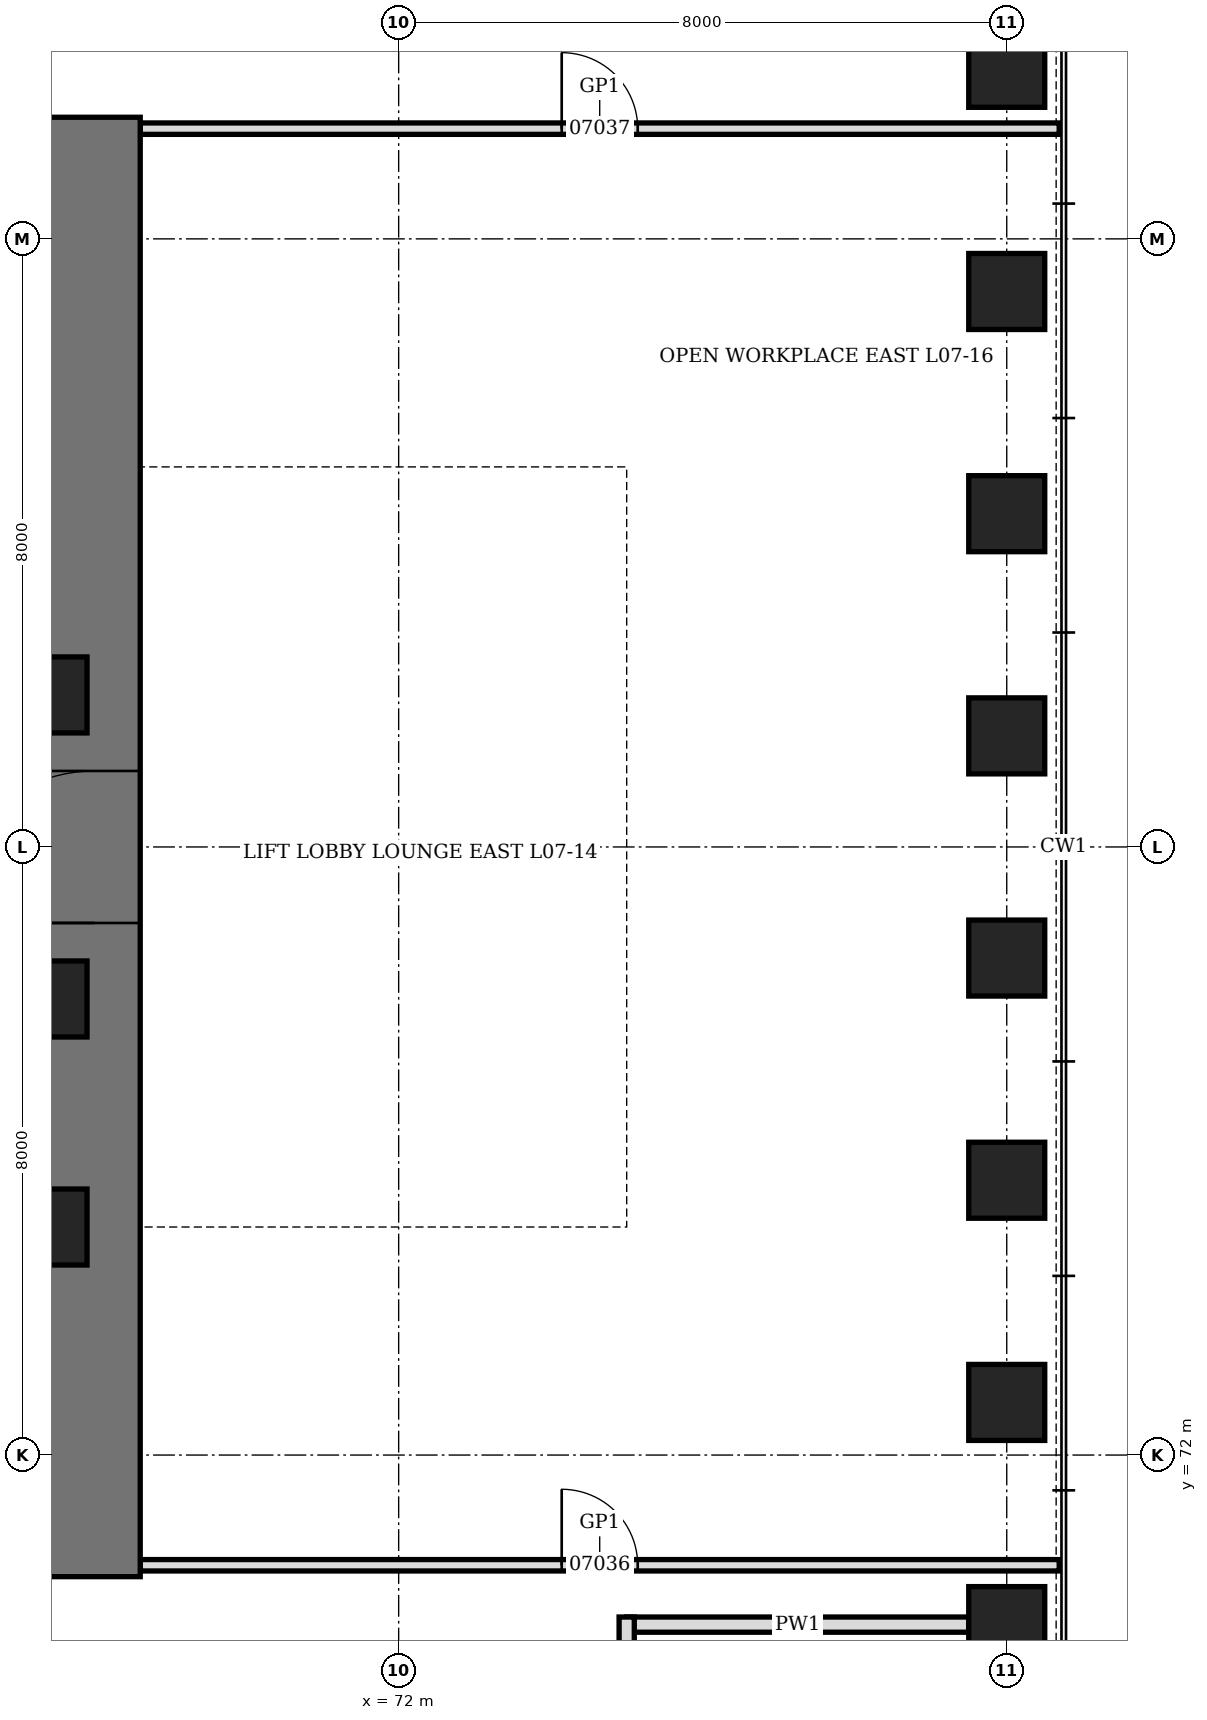
"""IFC4 building model, lengths in metres.
Left out: names, types, materials, properties, quantities, classifications, styles, units other than length and angle.
Written with IfcOpenShell. Run it as: python <this file> out.ifc"""

import sys

from ifc_helpers import new_model, si_unit, direction, frame, frame_2d, origin, origin_2d, place, context, subcontext, project, spatial, rectangle, hollow_rectangle, extrude, element, fill, save


model = new_model("IFC4")
c1 = context("Model", 3, precision=1e-05, world=origin(), true_north=direction((0.0, 1.0)))
c2 = subcontext(c1, "Body", "Model", "MODEL_VIEW")
j1 = project(units=[si_unit("LENGTHUNIT", "METRE"), si_unit("PLANEANGLEUNIT", "RADIAN")], contexts=[c1])
p1 = place(None, origin())
s1 = spatial("IfcSite", under=j1, at=p1, CompositionType="ELEMENT")
p2 = place(p1, origin())
s2 = spatial("IfcBuilding", under=s1, at=p2, CompositionType="ELEMENT")
p3 = place(p2, frame((0.0, 0.0, 39.1)))
s3 = spatial("IfcBuildingStorey", under=s2, at=p3, CompositionType="ELEMENT", Elevation=39.1)
for number, where, z_axis, x_axis in (
    (1, (80.0, 69.769, 0.0), (0.0, 0.0, 1.0), (0.0, 1.0, 0.0)),
    (2, (80.0, 72.692, 0.0), (0.0, 0.0, 1.0), (0.0, 1.0, 0.0)),
    (3, (80.0, 75.615, 0.0), (0.0, 0.0, 1.0), (0.0, 1.0, 0.0)),
    (4, (80.0, 78.539, 0.0), (0.0, 0.0, 1.0), (0.0, 1.0, 0.0)),
    (5, (80.0, 81.461, 0.0), (0.0, 0.0, 1.0), (0.0, 1.0, 0.0)),
    (6, (80.0, 84.385, 0.0), (0.0, 0.0, 1.0), (0.0, 1.0, 0.0)),
    (7, (80.0, 87.308, 0.0), (0.0, 0.0, 1.0), (0.0, 1.0, 0.0)),
    (8, (80.0, 90.231, 0.0), (0.0, 0.0, 1.0), (0.0, 1.0, 0.0)),
):
    element("IfcColumn", number, at=place(p3, frame(where, z_axis=z_axis, x_axis=x_axis)), inside=s3, PredefinedType="COLUMN", context=c2, shape_type="SweptSolid", body=[
        extrude(hollow_rectangle(XDim=1.0, YDim=1.0, WallThickness=0.35, at=origin_2d()), origin(), (0.0, 0.0, 1.0), 4.2),
    ])
p4 = place(p3, frame((68.0, 70.4, 0.0), z_axis=(0.0, 0.0, 1.0), x_axis=(0.0, 1.0, 0.0)))
e9 = element("IfcWall", 9, at=p4, inside=s3, PredefinedType="SHEAR", context=c2, shape_type="SweptSolid", body=[
    extrude(rectangle(XDim=19.2, YDim=1.2, at=frame_2d((9.6, 0.0))), origin(), (0.0, 0.0, 1.0), 4.2),
])
p5 = place(p4, frame((8.6, 0.0, 0.0)))
e10 = element("IfcOpeningElement", 10, at=p5, cuts=e9, PredefinedType="OPENING", context=c2, shape_type="SweptSolid", body=[
    extrude(rectangle(XDim=2.0, YDim=2.4, at=frame_2d((1.0, 1.2))), frame((0.0, 0.61, 0.0), z_axis=(0.0, -1.0, 0.0), x_axis=(1.0, 0.0, 0.0)), (0.0, 0.0, 1.0), 1.22),
])
for number, where, z_axis, x_axis in (
    (11, (67.4, 75.0, 0.0), (0.0, 0.0, 1.0), (1.0, 0.0, 0.0)),
    (12, (67.4, 78.0, 0.0), (0.0, 0.0, 1.0), (1.0, 0.0, 0.0)),
    (13, (67.4, 82.0, 0.0), (0.0, 0.0, 1.0), (1.0, 0.0, 0.0)),
):
    element("IfcColumn", number, at=place(p3, frame(where, z_axis=z_axis, x_axis=x_axis)), inside=s3, PredefinedType="COLUMN", context=c2, shape_type="SweptSolid", body=[
        extrude(hollow_rectangle(XDim=1.0, YDim=1.0, WallThickness=0.15, at=origin_2d()), origin(), (0.0, 0.0, 1.0), 4.2),
    ])
p6 = place(p3, frame((75.0, 69.769, 0.0), z_axis=(0.0, 0.0, 1.0), x_axis=(1.0, 0.0, 0.0)))
e14 = element("IfcWall", 14, at=p6, inside=s3, PredefinedType="PARTITIONING", context=c2, shape_type="SweptSolid", body=[
    extrude(rectangle(XDim=4.5, YDim=0.2, at=frame_2d((2.25, 0.0))), origin(), (0.0, 0.0, 1.0), 3.428),
])
p7 = place(p3, frame((68.6, 70.55, 0.0), z_axis=(0.0, 0.0, 1.0), x_axis=(1.0, 0.0, 0.0)))
e15 = element("IfcWall", 15, at=p7, inside=s3, PredefinedType="PARTITIONING", context=c2, shape_type="SweptSolid", body=[
    extrude(rectangle(XDim=12.09, YDim=0.15, at=frame_2d((6.045, 0.0))), origin(), (0.0, 0.0, 1.0), 4.04),
])
p8 = place(p7, frame((5.545, 0.0, 0.0)))
e16 = element("IfcOpeningElement", 16, at=p8, cuts=e15, PredefinedType="OPENING", context=c2, shape_type="SweptSolid", body=[
    extrude(rectangle(XDim=1.0, YDim=2.4, at=frame_2d((0.5, 1.2))), frame((0.0, 0.085, 0.0), z_axis=(0.0, -1.0, 0.0), x_axis=(1.0, 0.0, 0.0)), (0.0, 0.0, 1.0), 0.17),
])
p9 = place(p3, frame((68.6, 89.45, 0.0), z_axis=(0.0, 0.0, 1.0), x_axis=(1.0, 0.0, 0.0)))
e17 = element("IfcWall", 17, at=p9, inside=s3, PredefinedType="PARTITIONING", context=c2, shape_type="SweptSolid", body=[
    extrude(rectangle(XDim=12.09, YDim=0.15, at=frame_2d((6.045, 0.0))), origin(), (0.0, 0.0, 1.0), 4.04),
])
p10 = place(p9, frame((5.545, 0.0, 0.0)))
e18 = element("IfcOpeningElement", 18, at=p10, cuts=e17, PredefinedType="OPENING", context=c2, shape_type="SweptSolid", body=[
    extrude(rectangle(XDim=1.0, YDim=2.4, at=frame_2d((0.5, 1.2))), frame((0.0, 0.085, 0.0), z_axis=(0.0, -1.0, 0.0), x_axis=(1.0, 0.0, 0.0)), (0.0, 0.0, 1.0), 0.17),
])
p11 = place(p3, frame((75.0, 61.5, 0.0), z_axis=(0.0, 0.0, 1.0), x_axis=(0.0, 1.0, 0.0)))
e19 = element("IfcWall", 19, at=p11, inside=s3, PredefinedType="PARTITIONING", context=c2, shape_type="SweptSolid", body=[
    extrude(rectangle(XDim=8.369, YDim=0.2, at=frame_2d((4.185, 0.0))), origin(), (0.0, 0.0, 1.0), 4.04),
])
p12 = place(p11, frame((3.385, 0.0, 0.0)))
e20 = element("IfcOpeningElement", 20, at=p12, cuts=e19, PredefinedType="OPENING", context=c2, shape_type="SweptSolid", body=[
    extrude(rectangle(XDim=1.0, YDim=2.1, at=frame_2d((0.5, 1.05))), frame((0.0, 0.11, 0.0), z_axis=(0.0, -1.0, 0.0), x_axis=(1.0, 0.0, 0.0)), (0.0, 0.0, 1.0), 0.22),
])
p13 = place(p5, origin())
e21 = element("IfcDoor", 21, at=p13, inside=s3, OperationType="DOUBLE_DOOR_SINGLE_SWING", PredefinedType="DOOR", context=c2, shape_type="SweptSolid", body=[
    extrude(rectangle(XDim=2.0, YDim=2.4, at=frame_2d((1.0, 1.2))), frame((0.0, 0.35, 0.0), z_axis=(0.0, -1.0, 0.0), x_axis=(1.0, 0.0, 0.0)), (0.0, 0.0, 1.0), 0.7),
])
fill(e10, e21)
p14 = place(p8, origin())
e22 = element("IfcDoor", 22, at=p14, inside=s3, OperationType="SINGLE_SWING_RIGHT", PredefinedType="DOOR", context=c2, shape_type="SweptSolid", body=[
    extrude(rectangle(XDim=1.0, YDim=2.4, at=frame_2d((0.5, 1.2))), frame((0.0, 0.075, 0.0), z_axis=(0.0, -1.0, 0.0), x_axis=(1.0, 0.0, 0.0)), (0.0, 0.0, 1.0), 0.149),
])
fill(e16, e22)
p15 = place(p10, origin())
e23 = element("IfcDoor", 23, at=p15, inside=s3, OperationType="SINGLE_SWING_RIGHT", PredefinedType="DOOR", context=c2, shape_type="SweptSolid", body=[
    extrude(rectangle(XDim=1.0, YDim=2.4, at=frame_2d((0.5, 1.2))), frame((0.0, 0.075, 0.0), z_axis=(0.0, -1.0, 0.0), x_axis=(1.0, 0.0, 0.0)), (0.0, 0.0, 1.0), 0.149),
])
fill(e18, e23)
save(model, sys.argv[1])
